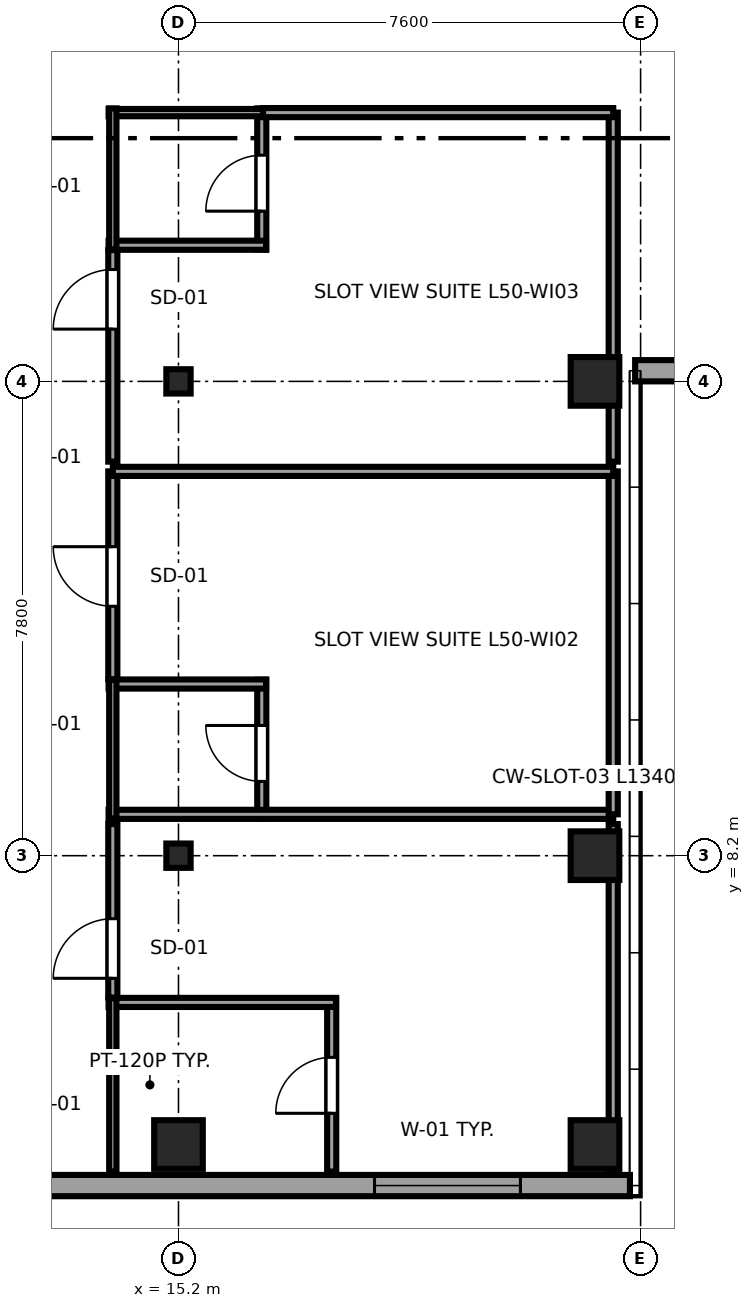
"""IFC4 building model, lengths in metres.
Left out: names, types, materials, properties, quantities, classifications, styles, units other than length and angle.
Written with IfcOpenShell. Run it as: python <this file> out.ifc"""

import sys

from ifc_helpers import new_model, si_unit, direction, frame, frame_2d, origin, origin_2d, place, context, subcontext, project, spatial, rectangle, i_section, extrude, source, transform, mapped, element, fill, save


model = new_model("IFC4")
c1 = context("Model", 3, precision=1e-05, world=origin(), true_north=direction((0.0, 1.0)))
c2 = subcontext(c1, "Body", "Model", "MODEL_VIEW")
j1 = project(units=[si_unit("LENGTHUNIT", "METRE"), si_unit("PLANEANGLEUNIT", "RADIAN")], contexts=[c1])
p1 = place(None, origin())
s1 = spatial("IfcSite", under=j1, at=p1, CompositionType="ELEMENT")
p2 = place(p1, origin())
s2 = spatial("IfcBuilding", under=s1, at=p2, CompositionType="ELEMENT")
p3 = place(p2, frame((0.0, 0.0, 191.1)))
s3 = spatial("IfcBuildingStorey", under=s2, at=p3, CompositionType="ELEMENT", Elevation=191.1)
m1 = source(origin(), c2, "Body", "SweptSolid", [
    extrude(rectangle(XDim=0.8, YDim=0.8, at=origin_2d()), origin(), (0.0, 0.0, 1.0), 3.55),
])
p4 = place(p3, frame((15.2, 3.45, 0.0), z_axis=(0.0, 0.0, 1.0), x_axis=(1.0, 0.0, 0.0)))
e1 = element("IfcColumn", 1, at=p4, inside=s3, PredefinedType="COLUMN", context=c2, shape_type="MappedRepresentation", body=[
    mapped(m1, transform((0.0, 0.0, 0.0), x_axis=(1.0, 0.0, 0.0), y_axis=(0.0, 1.0, 0.0), z_axis=(0.0, 0.0, 1.0), scale=1.0)),
])
m2 = source(origin(), c2, "Body", "SweptSolid", [
    extrude(i_section(OverallWidth=0.4, OverallDepth=0.4, WebThickness=0.02, FlangeThickness=0.035, at=origin_2d()), origin(), (0.0, 0.0, 1.0), 3.55),
])
for number, where, z_axis, x_axis in (
    (2, (15.2, 8.2, 0.0), (0.0, 0.0, 1.0), (1.0, 0.0, 0.0)),
    (3, (15.2, 16.0, 0.0), (0.0, 0.0, 1.0), (1.0, 0.0, 0.0)),
):
    element("IfcColumn", number, at=place(p3, frame(where, z_axis=z_axis, x_axis=x_axis)), inside=s3, PredefinedType="COLUMN", context=c2, shape_type="MappedRepresentation", body=[
        mapped(m2, transform((0.0, 0.0, 0.0), x_axis=(1.0, 0.0, 0.0), y_axis=(0.0, 1.0, 0.0), z_axis=(0.0, 0.0, 1.0), scale=1.0)),
    ])
for number, where, z_axis, x_axis in (
    (4, (22.05, 3.45, 0.0), (0.0, 0.0, 1.0), (1.0, 0.0, 0.0)),
    (5, (22.05, 8.2, 0.0), (0.0, 0.0, 1.0), (1.0, 0.0, 0.0)),
    (6, (22.05, 16.0, 0.0), (0.0, 0.0, 1.0), (1.0, 0.0, 0.0)),
):
    element("IfcColumn", number, at=place(p3, frame(where, z_axis=z_axis, x_axis=x_axis)), inside=s3, PredefinedType="COLUMN", context=c2, shape_type="MappedRepresentation", body=[
        mapped(m1, transform((0.0, 0.0, 0.0), x_axis=(1.0, 0.0, 0.0), y_axis=(0.0, 1.0, 0.0), z_axis=(0.0, 0.0, 1.0), scale=1.0)),
    ])
p5 = place(p3, frame((7.017, 2.775, 0.0), z_axis=(0.0, 0.0, 1.0), x_axis=(1.0, 0.0, 0.0)))
e7 = element("IfcWall", 7, at=p5, inside=s3, PredefinedType="SOLIDWALL", context=c2, shape_type="SweptSolid", body=[
    extrude(rectangle(XDim=15.608, YDim=0.35, at=frame_2d((7.804, 0.0))), origin(), (0.0, 0.0, 1.0), 3.37),
])
p6 = place(p5, frame((1.801, 0.0, 0.68)))
e8 = element("IfcOpeningElement", 8, at=p6, cuts=e7, PredefinedType="OPENING", context=c2, shape_type="SweptSolid", body=[
    extrude(rectangle(XDim=2.4, YDim=1.9, at=frame_2d((1.2, 0.95))), frame((0.0, 0.185, 0.0), z_axis=(0.0, -1.0, 0.0), x_axis=(1.0, 0.0, 0.0)), (0.0, 0.0, 1.0), 0.37),
])
p7 = place(p5, frame((11.407, 0.0, 0.68)))
e9 = element("IfcOpeningElement", 9, at=p7, cuts=e7, PredefinedType="OPENING", context=c2, shape_type="SweptSolid", body=[
    extrude(rectangle(XDim=2.4, YDim=1.9, at=frame_2d((1.2, 0.95))), frame((0.0, 0.185, 0.0), z_axis=(0.0, -1.0, 0.0), x_axis=(1.0, 0.0, 0.0)), (0.0, 0.0, 1.0), 0.37),
])
p8 = place(p3, frame((22.71, 16.175, 0.0), z_axis=(0.0, 0.0, 1.0), x_axis=(1.0, 0.0, 0.0)))
e10 = element("IfcWall", 10, at=p8, inside=s3, PredefinedType="SOLIDWALL", context=c2, shape_type="SweptSolid", body=[
    extrude(rectangle(XDim=11.58, YDim=0.35, at=frame_2d((5.79, 0.0))), origin(), (0.0, 0.0, 1.0), 2.758),
])
p9 = place(p8, frame((1.995, 0.0, 0.68)))
e11 = element("IfcOpeningElement", 11, at=p9, cuts=e10, PredefinedType="OPENING", context=c2, shape_type="SweptSolid", body=[
    extrude(rectangle(XDim=2.4, YDim=1.9, at=frame_2d((1.2, 0.95))), frame((0.0, 0.185, 0.0), z_axis=(0.0, -1.0, 0.0), x_axis=(1.0, 0.0, 0.0)), (0.0, 0.0, 1.0), 0.37),
])
p10 = place(p8, frame((7.185, 0.0, 0.68)))
e12 = element("IfcOpeningElement", 12, at=p10, cuts=e10, PredefinedType="OPENING", context=c2, shape_type="SweptSolid", body=[
    extrude(rectangle(XDim=2.4, YDim=1.9, at=frame_2d((1.2, 0.95))), frame((0.0, 0.185, 0.0), z_axis=(0.0, -1.0, 0.0), x_axis=(1.0, 0.0, 0.0)), (0.0, 0.0, 1.0), 0.37),
])
p11 = place(p3, frame((17.72, 3.005, 0.0), z_axis=(0.0, 0.0, 1.0), x_axis=(0.0, 1.0, 0.0)))
e13 = element("IfcWall", 13, at=p11, inside=s3, PredefinedType="PARTITIONING", context=c2, shape_type="SweptSolid", body=[
    extrude(rectangle(XDim=2.852, YDim=0.15, at=frame_2d((1.426, 0.0))), origin(), (0.0, 0.0, 1.0), 3.37),
])
p12 = place(p11, frame((0.958, 0.0, 0.0)))
e14 = element("IfcOpeningElement", 14, at=p12, cuts=e13, PredefinedType="OPENING", context=c2, shape_type="SweptSolid", body=[
    extrude(rectangle(XDim=0.92, YDim=2.01, at=frame_2d((0.46, 1.005))), frame((0.0, 0.085, 0.0), z_axis=(0.0, -1.0, 0.0), x_axis=(1.0, 0.0, 0.0)), (0.0, 0.0, 1.0), 0.17),
])
p13 = place(p3, frame((14.05, 5.787, 0.0), z_axis=(0.0, 0.0, 1.0), x_axis=(1.0, 0.0, 0.0)))
e15 = element("IfcWall", 15, at=p13, inside=s3, PredefinedType="PARTITIONING", context=c2, shape_type="SweptSolid", body=[
    extrude(rectangle(XDim=3.74, YDim=0.15, at=frame_2d((1.87, 0.0))), origin(), (0.0, 0.0, 1.0), 3.37),
])
p14 = place(p3, frame((14.12, 3.005, 0.0), z_axis=(0.0, 0.0, 1.0), x_axis=(0.0, 1.0, 0.0)))
e16 = element("IfcWall", 16, at=p14, inside=s3, PredefinedType="PLUMBINGWALL", context=c2, shape_type="SweptSolid", body=[
    extrude(rectangle(XDim=2.852, YDim=0.12, at=frame_2d((1.426, 0.0))), origin(), (0.0, 0.0, 1.0), 3.37),
])
p15 = place(p3, frame((16.57, 8.81, 0.0), z_axis=(0.0, 0.0, 1.0), x_axis=(0.0, 1.0, 0.0)))
e17 = element("IfcWall", 17, at=p15, inside=s3, PredefinedType="PARTITIONING", context=c2, shape_type="SweptSolid", body=[
    extrude(rectangle(XDim=2.283, YDim=0.15, at=frame_2d((1.142, 0.0))), origin(), (0.0, 0.0, 1.0), 3.37),
])
p16 = place(p15, frame((0.612, 0.0, 0.0)))
e18 = element("IfcOpeningElement", 18, at=p16, cuts=e17, PredefinedType="OPENING", context=c2, shape_type="SweptSolid", body=[
    extrude(rectangle(XDim=0.92, YDim=2.01, at=frame_2d((0.46, 1.005))), frame((0.0, 0.085, 0.0), z_axis=(0.0, -1.0, 0.0), x_axis=(1.0, 0.0, 0.0)), (0.0, 0.0, 1.0), 0.17),
])
p17 = place(p3, frame((14.05, 8.88, 0.0), z_axis=(0.0, 0.0, 1.0), x_axis=(1.0, 0.0, 0.0)))
e19 = element("IfcWall", 19, at=p17, inside=s3, PredefinedType="PARTITIONING", context=c2, shape_type="SweptSolid", body=[
    extrude(rectangle(XDim=8.3, YDim=0.15, at=frame_2d((4.15, 0.0))), origin(), (0.0, 0.0, 1.0), 3.37),
])
p18 = place(p3, frame((14.05, 11.023, 0.0), z_axis=(0.0, 0.0, 1.0), x_axis=(1.0, 0.0, 0.0)))
e20 = element("IfcWall", 20, at=p18, inside=s3, PredefinedType="PARTITIONING", context=c2, shape_type="SweptSolid", body=[
    extrude(rectangle(XDim=2.59, YDim=0.15, at=frame_2d((1.295, 0.0))), origin(), (0.0, 0.0, 1.0), 3.37),
])
p19 = place(p3, frame((14.12, 8.81, 0.0), z_axis=(0.0, 0.0, 1.0), x_axis=(0.0, 1.0, 0.0)))
e21 = element("IfcWall", 21, at=p19, inside=s3, PredefinedType="PLUMBINGWALL", context=c2, shape_type="SweptSolid", body=[
    extrude(rectangle(XDim=2.283, YDim=0.12, at=frame_2d((1.142, 0.0))), origin(), (0.0, 0.0, 1.0), 3.37),
])
p20 = place(p3, frame((16.57, 18.169, 0.0), z_axis=(0.0, 0.0, 1.0), x_axis=(0.0, 1.0, 0.0)))
e22 = element("IfcWall", 22, at=p20, inside=s3, PredefinedType="PARTITIONING", context=c2, shape_type="SweptSolid", body=[
    extrude(rectangle(XDim=2.321, YDim=0.15, at=frame_2d((1.161, 0.0))), origin(), (0.0, 0.0, 1.0), 3.37),
])
p21 = place(p20, frame((0.631, 0.0, 0.0)))
e23 = element("IfcOpeningElement", 23, at=p21, cuts=e22, PredefinedType="OPENING", context=c2, shape_type="SweptSolid", body=[
    extrude(rectangle(XDim=0.92, YDim=2.01, at=frame_2d((0.46, 1.005))), frame((0.0, 0.085, 0.0), z_axis=(0.0, -1.0, 0.0), x_axis=(1.0, 0.0, 0.0)), (0.0, 0.0, 1.0), 0.17),
])
p22 = place(p3, frame((14.05, 18.239, 0.0), z_axis=(0.0, 0.0, 1.0), x_axis=(1.0, 0.0, 0.0)))
e24 = element("IfcWall", 24, at=p22, inside=s3, PredefinedType="PARTITIONING", context=c2, shape_type="SweptSolid", body=[
    extrude(rectangle(XDim=2.59, YDim=0.15, at=frame_2d((1.295, 0.0))), origin(), (0.0, 0.0, 1.0), 3.37),
])
p23 = place(p3, frame((14.05, 20.42, 0.0), z_axis=(0.0, 0.0, 1.0), x_axis=(1.0, 0.0, 0.0)))
e25 = element("IfcWall", 25, at=p23, inside=s3, PredefinedType="PLUMBINGWALL", context=c2, shape_type="SweptSolid", body=[
    extrude(rectangle(XDim=2.59, YDim=0.12, at=frame_2d((1.295, 0.0))), origin(), (0.0, 0.0, 1.0), 3.37),
])
p24 = place(p3, frame((14.12, 18.169, 0.0), z_axis=(0.0, 0.0, 1.0), x_axis=(0.0, 1.0, 0.0)))
e26 = element("IfcWall", 26, at=p24, inside=s3, PredefinedType="PLUMBINGWALL", context=c2, shape_type="SweptSolid", body=[
    extrude(rectangle(XDim=2.321, YDim=0.12, at=frame_2d((1.161, 0.0))), origin(), (0.0, 0.0, 1.0), 3.37),
])
p25 = place(p3, frame((14.12, 5.867, 0.0), z_axis=(0.0, 0.0, 1.0), x_axis=(0.0, 1.0, 0.0)))
e27 = element("IfcWall", 27, at=p25, inside=s3, PredefinedType="PARTITIONING", context=c2, shape_type="SweptSolid", body=[
    extrude(rectangle(XDim=2.853, YDim=0.15, at=frame_2d((1.427, 0.0))), origin(), (0.0, 0.0, 1.0), 3.37),
])
p26 = place(p25, frame((0.316, 0.0, 0.0)))
e28 = element("IfcOpeningElement", 28, at=p26, cuts=e27, PredefinedType="OPENING", context=c2, shape_type="SweptSolid", body=[
    extrude(rectangle(XDim=0.98, YDim=2.12, at=frame_2d((0.49, 1.06))), frame((0.0, 0.085, 0.0), z_axis=(0.0, -1.0, 0.0), x_axis=(1.0, 0.0, 0.0)), (0.0, 0.0, 1.0), 0.17),
])
p27 = place(p3, frame((22.35, 3.005, 0.0), z_axis=(0.0, 0.0, 1.0), x_axis=(0.0, 1.0, 0.0)))
e29 = element("IfcWall", 29, at=p27, inside=s3, PredefinedType="PARTITIONING", context=c2, shape_type="SweptSolid", body=[
    extrude(rectangle(XDim=5.715, YDim=0.15, at=frame_2d((2.857, 0.0))), origin(), (0.0, 0.0, 1.0), 3.37),
])
p28 = place(p3, frame((14.12, 11.103, 0.0), z_axis=(0.0, 0.0, 1.0), x_axis=(0.0, 1.0, 0.0)))
e30 = element("IfcWall", 30, at=p28, inside=s3, PredefinedType="PARTITIONING", context=c2, shape_type="SweptSolid", body=[
    extrude(rectangle(XDim=3.417, YDim=0.15, at=frame_2d((1.708, 0.0))), origin(), (0.0, 0.0, 1.0), 3.37),
])
p29 = place(p28, frame((1.198, 0.0, 0.0)))
e31 = element("IfcOpeningElement", 31, at=p29, cuts=e30, PredefinedType="OPENING", context=c2, shape_type="SweptSolid", body=[
    extrude(rectangle(XDim=0.98, YDim=2.12, at=frame_2d((0.49, 1.06))), frame((0.0, 0.085, 0.0), z_axis=(0.0, -1.0, 0.0), x_axis=(1.0, 0.0, 0.0)), (0.0, 0.0, 1.0), 0.17),
])
p30 = place(p3, frame((22.35, 8.88, 0.0), z_axis=(0.0, 0.0, 1.0), x_axis=(0.0, 1.0, 0.0)))
e32 = element("IfcWall", 32, at=p30, inside=s3, PredefinedType="PARTITIONING", context=c2, shape_type="SweptSolid", body=[
    extrude(rectangle(XDim=5.64, YDim=0.15, at=frame_2d((2.82, 0.0))), origin(), (0.0, 0.0, 1.0), 3.37),
])
p31 = place(p3, frame((14.12, 14.52, 0.0), z_axis=(0.0, 0.0, 1.0), x_axis=(1.0, 0.0, 0.0)))
e33 = element("IfcWall", 33, at=p31, inside=s3, PredefinedType="PARTITIONING", context=c2, shape_type="SweptSolid", body=[
    extrude(rectangle(XDim=8.23, YDim=0.15, at=frame_2d((4.115, 0.0))), origin(), (0.0, 0.0, 1.0), 3.37),
])
p32 = place(p3, frame((14.12, 14.68, 0.0), z_axis=(0.0, 0.0, 1.0), x_axis=(0.0, 1.0, 0.0)))
e34 = element("IfcWall", 34, at=p32, inside=s3, PredefinedType="PARTITIONING", context=c2, shape_type="SweptSolid", body=[
    extrude(rectangle(XDim=3.479, YDim=0.15, at=frame_2d((1.74, 0.0))), origin(), (0.0, 0.0, 1.0), 3.37),
])
p33 = place(p32, frame((2.179, 0.0, 0.0)))
e35 = element("IfcOpeningElement", 35, at=p33, cuts=e34, PredefinedType="OPENING", context=c2, shape_type="SweptSolid", body=[
    extrude(rectangle(XDim=0.98, YDim=2.12, at=frame_2d((0.49, 1.06))), frame((0.0, 0.085, 0.0), z_axis=(0.0, -1.0, 0.0), x_axis=(1.0, 0.0, 0.0)), (0.0, 0.0, 1.0), 0.17),
])
p34 = place(p3, frame((22.35, 14.68, 0.0), z_axis=(0.0, 0.0, 1.0), x_axis=(0.0, 1.0, 0.0)))
e36 = element("IfcWall", 36, at=p34, inside=s3, PredefinedType="PARTITIONING", context=c2, shape_type="SweptSolid", body=[
    extrude(rectangle(XDim=5.74, YDim=0.15, at=frame_2d((2.87, 0.0))), origin(), (0.0, 0.0, 1.0), 3.37),
])
p35 = place(p3, frame((16.59, 20.42, 0.0), z_axis=(0.0, 0.0, 1.0), x_axis=(1.0, 0.0, 0.0)))
e37 = element("IfcWall", 37, at=p35, inside=s3, PredefinedType="PARTITIONING", context=c2, shape_type="SweptSolid", body=[
    extrude(rectangle(XDim=5.76, YDim=0.15, at=frame_2d((2.88, 0.0))), origin(), (0.0, 0.0, 1.0), 3.37),
])
m3 = source(origin(), c2, "Body", "SweptSolid", [
    extrude(rectangle(XDim=2.4, YDim=1.9, at=frame_2d((1.2, 0.95))), frame((0.0, 0.09, 0.0), z_axis=(0.0, -1.0, 0.0), x_axis=(1.0, 0.0, 0.0)), (0.0, 0.0, 1.0), 0.06),
])
p36 = place(p7, origin())
e38 = element("IfcWindow", 38, at=p36, inside=s3, PartitioningType="TRIPLE_PANEL_HORIZONTAL", PredefinedType="WINDOW", context=c2, shape_type="MappedRepresentation", body=[
    mapped(m3, transform((0.0, 0.0, 0.0), x_axis=(1.0, 0.0, 0.0), y_axis=(0.0, 1.0, 0.0), z_axis=(0.0, 0.0, 1.0), scale=1.0)),
])
fill(e9, e38)
m4 = source(origin(), c2, "Body", "SweptSolid", [
    extrude(rectangle(XDim=0.92, YDim=2.01, at=frame_2d((0.46, 1.005))), frame((0.0, 0.025, 0.0), z_axis=(0.0, -1.0, 0.0), x_axis=(1.0, 0.0, 0.0)), (0.0, 0.0, 1.0), 0.05),
])
p37 = place(p12, origin())
e39 = element("IfcDoor", 39, at=p37, inside=s3, OperationType="SINGLE_SWING_LEFT", PredefinedType="DOOR", context=c2, shape_type="MappedRepresentation", body=[
    mapped(m4, transform((0.0, 0.0, 0.0), x_axis=(1.0, 0.0, 0.0), y_axis=(0.0, 1.0, 0.0), z_axis=(0.0, 0.0, 1.0), scale=1.0)),
])
fill(e14, e39)
p38 = place(p16, origin())
e40 = element("IfcDoor", 40, at=p38, inside=s3, OperationType="SINGLE_SWING_RIGHT", PredefinedType="DOOR", context=c2, shape_type="MappedRepresentation", body=[
    mapped(m4, transform((0.0, 0.0, 0.0), x_axis=(1.0, 0.0, 0.0), y_axis=(0.0, 1.0, 0.0), z_axis=(0.0, 0.0, 1.0), scale=1.0)),
])
fill(e18, e40)
p39 = place(p21, origin())
e41 = element("IfcDoor", 41, at=p39, inside=s3, OperationType="SINGLE_SWING_LEFT", PredefinedType="DOOR", context=c2, shape_type="MappedRepresentation", body=[
    mapped(m4, transform((0.0, 0.0, 0.0), x_axis=(1.0, 0.0, 0.0), y_axis=(0.0, 1.0, 0.0), z_axis=(0.0, 0.0, 1.0), scale=1.0)),
])
fill(e23, e41)
m5 = source(origin(), c2, "Body", "SweptSolid", [
    extrude(rectangle(XDim=0.98, YDim=2.12, at=frame_2d((0.49, 1.06))), frame((0.0, 0.025, 0.0), z_axis=(0.0, -1.0, 0.0), x_axis=(1.0, 0.0, 0.0)), (0.0, 0.0, 1.0), 0.05),
])
p40 = place(p26, origin())
e42 = element("IfcDoor", 42, at=p40, inside=s3, OperationType="SINGLE_SWING_LEFT", PredefinedType="DOOR", context=c2, shape_type="MappedRepresentation", body=[
    mapped(m5, transform((0.0, 0.0, 0.0), x_axis=(1.0, 0.0, 0.0), y_axis=(0.0, 1.0, 0.0), z_axis=(0.0, 0.0, 1.0), scale=1.0)),
])
fill(e28, e42)
p41 = place(p29, origin())
e43 = element("IfcDoor", 43, at=p41, inside=s3, OperationType="SINGLE_SWING_RIGHT", PredefinedType="DOOR", context=c2, shape_type="MappedRepresentation", body=[
    mapped(m5, transform((0.0, 0.0, 0.0), x_axis=(1.0, 0.0, 0.0), y_axis=(0.0, 1.0, 0.0), z_axis=(0.0, 0.0, 1.0), scale=1.0)),
])
fill(e31, e43)
p42 = place(p33, origin())
e44 = element("IfcDoor", 44, at=p42, inside=s3, OperationType="SINGLE_SWING_LEFT", PredefinedType="DOOR", context=c2, shape_type="MappedRepresentation", body=[
    mapped(m5, transform((0.0, 0.0, 0.0), x_axis=(1.0, 0.0, 0.0), y_axis=(0.0, 1.0, 0.0), z_axis=(0.0, 0.0, 1.0), scale=1.0)),
])
fill(e35, e44)
save(model, sys.argv[1])
